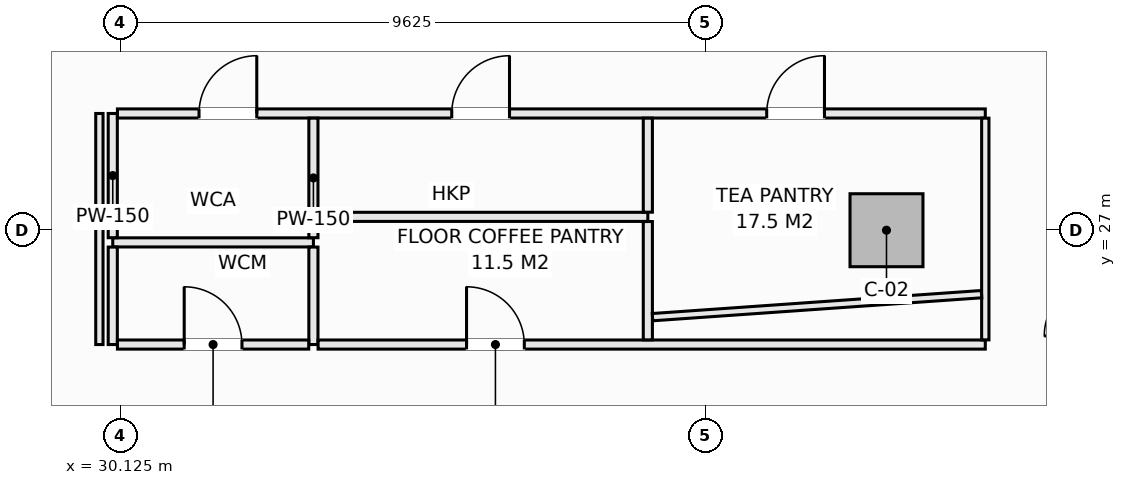
"""IFC4 building model, lengths in metres.
Left out: names, types, materials, properties, quantities, classifications, styles, units other than length and angle.
Written with IfcOpenShell. Run it as: python <this file> out.ifc"""

import sys

from ifc_helpers import new_model, si_unit, direction, frame, frame_2d, origin, origin_2d, place, context, subcontext, project, spatial, rectangle, extrude, element, fill, save


model = new_model("IFC4")
c1 = context("Model", 3, precision=1e-05, world=origin(), true_north=direction((0.0, 1.0)))
c2 = subcontext(c1, "Body", "Model", "MODEL_VIEW")
j1 = project(units=[si_unit("LENGTHUNIT", "METRE"), si_unit("PLANEANGLEUNIT", "RADIAN")], contexts=[c1])
p1 = place(None, origin())
s1 = spatial("IfcSite", under=j1, at=p1, CompositionType="ELEMENT")
p2 = place(p1, origin())
s2 = spatial("IfcBuilding", under=s1, at=p2, CompositionType="ELEMENT")
p3 = place(p2, frame((0.0, 0.0, 38.05)))
s3 = spatial("IfcBuildingStorey", under=s2, at=p3, CompositionType="ELEMENT", Elevation=38.05)
p4 = place(p3, frame((42.725, 27.0, -0.28), z_axis=(0.0, 0.0, 1.0), x_axis=(1.0, 0.0, 0.0)))
e1 = element("IfcColumn", 1, at=p4, inside=s3, PredefinedType="COLUMN", context=c2, shape_type="SweptSolid", body=[
    extrude(rectangle(XDim=1.2, YDim=1.2, at=origin_2d()), origin(), (0.0, 0.0, 1.0), 3.85),
])
p5 = place(p3, frame((30.0, 26.8, 0.0), z_axis=(0.0, 0.0, 1.0), x_axis=(1.0, 0.0, 0.0)))
e2 = element("IfcWall", 2, at=p5, inside=s3, PredefinedType="PARTITIONING", context=c2, shape_type="SweptSolid", body=[
    extrude(rectangle(XDim=3.3, YDim=0.15, at=frame_2d((1.65, 0.0))), origin(), (0.0, 0.0, 1.0), 3.57),
])
p6 = place(p3, frame((30.0, 25.12, 0.0), z_axis=(0.0, 0.0, 1.0), x_axis=(0.0, 1.0, 0.0)))
e3 = element("IfcWall", 3, at=p6, inside=s3, PredefinedType="PARTITIONING", context=c2, shape_type="SweptSolid", body=[
    extrude(rectangle(XDim=1.603, YDim=0.15, at=frame_2d((0.801, 0.0))), origin(), (0.0, 0.0, 1.0), 3.57),
])
p7 = place(p3, frame((30.0, 26.877, 0.0), z_axis=(0.0, 0.0, 1.0), x_axis=(0.0, 1.0, 0.0)))
e4 = element("IfcWall", 4, at=p7, inside=s3, PredefinedType="PARTITIONING", context=c2, shape_type="SweptSolid", body=[
    extrude(rectangle(XDim=2.043, YDim=0.15, at=frame_2d((1.021, 0.0))), origin(), (0.0, 0.0, 1.0), 3.57),
])
p8 = place(p3, frame((30.077, 28.92, 0.0), z_axis=(0.0, 0.0, 1.0), x_axis=(1.0, 0.0, 0.0)))
e5 = element("IfcWall", 5, at=p8, inside=s3, PredefinedType="PARTITIONING", context=c2, shape_type="SweptSolid", body=[
    extrude(rectangle(XDim=14.273, YDim=0.15, at=frame_2d((7.137, 0.0))), origin(), (0.0, 0.0, 1.0), 3.57),
])
p9 = place(p8, frame((1.342, 0.0, 0.0)))
e6 = element("IfcOpeningElement", 6, at=p9, cuts=e5, PredefinedType="OPENING", context=c2, shape_type="SweptSolid", body=[
    extrude(rectangle(XDim=0.95, YDim=2.1, at=frame_2d((0.475, 1.05))), frame((0.0, 0.085, 0.0), z_axis=(0.0, -1.0, 0.0), x_axis=(1.0, 0.0, 0.0)), (0.0, 0.0, 1.0), 0.17),
])
p10 = place(p8, frame((5.498, 0.0, 0.0)))
e7 = element("IfcOpeningElement", 7, at=p10, cuts=e5, PredefinedType="OPENING", context=c2, shape_type="SweptSolid", body=[
    extrude(rectangle(XDim=0.95, YDim=2.1, at=frame_2d((0.475, 1.05))), frame((0.0, 0.085, 0.0), z_axis=(0.0, -1.0, 0.0), x_axis=(1.0, 0.0, 0.0)), (0.0, 0.0, 1.0), 0.17),
])
p11 = place(p8, frame((10.678, 0.0, 0.0)))
e8 = element("IfcOpeningElement", 8, at=p11, cuts=e5, PredefinedType="OPENING", context=c2, shape_type="SweptSolid", body=[
    extrude(rectangle(XDim=0.95, YDim=2.1, at=frame_2d((0.475, 1.05))), frame((0.0, 0.085, 0.0), z_axis=(0.0, -1.0, 0.0), x_axis=(1.0, 0.0, 0.0)), (0.0, 0.0, 1.0), 0.17),
])
p12 = place(p3, frame((33.3, 25.12, 0.0), z_axis=(0.0, 0.0, 1.0), x_axis=(0.0, 1.0, 0.0)))
e9 = element("IfcWall", 9, at=p12, inside=s3, PredefinedType="PARTITIONING", context=c2, shape_type="SweptSolid", body=[
    extrude(rectangle(XDim=1.603, YDim=0.15, at=frame_2d((0.801, 0.0))), origin(), (0.0, 0.0, 1.0), 3.57),
])
p13 = place(p3, frame((33.3, 26.877, 0.0), z_axis=(0.0, 0.0, 1.0), x_axis=(0.0, 1.0, 0.0)))
e10 = element("IfcWall", 10, at=p13, inside=s3, PredefinedType="PARTITIONING", context=c2, shape_type="SweptSolid", body=[
    extrude(rectangle(XDim=1.966, YDim=0.15, at=frame_2d((0.983, 0.0))), origin(), (0.0, 0.0, 1.0), 3.57),
])
p14 = place(p3, frame((30.077, 25.12, 0.0), z_axis=(0.0, 0.0, 1.0), x_axis=(1.0, 0.0, 0.0)))
e11 = element("IfcWall", 11, at=p14, inside=s3, PredefinedType="PARTITIONING", context=c2, shape_type="SweptSolid", body=[
    extrude(rectangle(XDim=3.146, YDim=0.15, at=frame_2d((1.573, 0.0))), origin(), (0.0, 0.0, 1.0), 3.57),
])
p15 = place(p14, frame((1.098, 0.0, 0.0)))
e12 = element("IfcOpeningElement", 12, at=p15, cuts=e11, PredefinedType="OPENING", context=c2, shape_type="SweptSolid", body=[
    extrude(rectangle(XDim=0.95, YDim=2.1, at=frame_2d((0.475, 1.05))), frame((0.0, 0.085, 0.0), z_axis=(0.0, -1.0, 0.0), x_axis=(1.0, 0.0, 0.0)), (0.0, 0.0, 1.0), 0.17),
])
p16 = place(p3, frame((33.377, 25.12, 0.0), z_axis=(0.0, 0.0, 1.0), x_axis=(1.0, 0.0, 0.0)))
e13 = element("IfcWall", 13, at=p16, inside=s3, PredefinedType="PARTITIONING", context=c2, shape_type="SweptSolid", body=[
    extrude(rectangle(XDim=10.973, YDim=0.15, at=frame_2d((5.487, 0.0))), origin(), (0.0, 0.0, 1.0), 3.57),
])
p17 = place(p16, frame((2.441, 0.0, 0.0)))
e14 = element("IfcOpeningElement", 14, at=p17, cuts=e13, PredefinedType="OPENING", context=c2, shape_type="SweptSolid", body=[
    extrude(rectangle(XDim=0.95, YDim=2.1, at=frame_2d((0.475, 1.05))), frame((0.0, 0.085, 0.0), z_axis=(0.0, -1.0, 0.0), x_axis=(1.0, 0.0, 0.0)), (0.0, 0.0, 1.0), 0.17),
])
p18 = place(p3, frame((33.377, 27.22, 0.0), z_axis=(0.0, 0.0, 1.0), x_axis=(1.0, 0.0, 0.0)))
e15 = element("IfcWall", 15, at=p18, inside=s3, PredefinedType="PARTITIONING", context=c2, shape_type="SweptSolid", body=[
    extrude(rectangle(XDim=5.423, YDim=0.15, at=frame_2d((2.711, 0.0))), origin(), (0.0, 0.0, 1.0), 3.57),
])
p19 = place(p3, frame((38.8, 25.197, 0.0), z_axis=(0.0, 0.0, 1.0), x_axis=(0.0, 1.0, 0.0)))
e16 = element("IfcWall", 16, at=p19, inside=s3, PredefinedType="PARTITIONING", context=c2, shape_type="SweptSolid", body=[
    extrude(rectangle(XDim=1.946, YDim=0.15, at=frame_2d((0.973, 0.0))), origin(), (0.0, 0.0, 1.0), 3.57),
])
p20 = place(p3, frame((38.8, 27.297, 0.0), z_axis=(0.0, 0.0, 1.0), x_axis=(0.0, 1.0, 0.0)))
e17 = element("IfcWall", 17, at=p20, inside=s3, PredefinedType="PARTITIONING", context=c2, shape_type="SweptSolid", body=[
    extrude(rectangle(XDim=1.546, YDim=0.15, at=frame_2d((0.773, 0.0))), origin(), (0.0, 0.0, 1.0), 3.57),
])
p21 = place(p3, frame((29.78, 25.12, 0.0), z_axis=(0.0, 0.0, 1.0), x_axis=(0.0, 1.0, 0.0)))
e18 = element("IfcWall", 18, at=p21, inside=s3, PredefinedType="PARTITIONING", context=c2, shape_type="SweptSolid", body=[
    extrude(rectangle(XDim=3.8, YDim=0.12, at=frame_2d((1.9, 0.0))), origin(), (0.0, 0.0, 1.0), 3.57),
])
p22 = place(p3, frame((44.35, 25.197, 0.0), z_axis=(0.0, 0.0, 1.0), x_axis=(0.0, 1.0, 0.0)))
e19 = element("IfcWall", 19, at=p22, inside=s3, PredefinedType="PARTITIONING", context=c2, shape_type="SweptSolid", body=[
    extrude(rectangle(XDim=3.646, YDim=0.12, at=frame_2d((1.823, 0.0))), origin(), (0.0, 0.0, 1.0), 3.57),
])
p23 = place(p3, frame((38.877, 25.57, 0.0), z_axis=(0.0, 0.0, 1.0), x_axis=(0.997563605061, 0.069762840094, 0.0)))
e20 = element("IfcWall", 20, at=p23, inside=s3, PredefinedType="PARTITIONING", context=c2, shape_type="SweptSolid", body=[
    extrude(rectangle(XDim=5.424, YDim=0.12, at=frame_2d((2.712, 0.0))), origin(), (0.0, 0.0, 1.0), 3.57),
])
p24 = place(p9, origin())
e21 = element("IfcDoor", 21, at=p24, inside=s3, OperationType="SINGLE_SWING_RIGHT", PredefinedType="DOOR", context=c2, shape_type="SweptSolid", body=[
    extrude(rectangle(XDim=0.95, YDim=2.1, at=frame_2d((0.475, 1.05))), frame((0.0, 0.025, 0.0), z_axis=(0.0, -1.0, 0.0), x_axis=(1.0, 0.0, 0.0)), (0.0, 0.0, 1.0), 0.05),
])
fill(e6, e21)
p25 = place(p15, origin())
e22 = element("IfcDoor", 22, at=p25, inside=s3, OperationType="SINGLE_SWING_LEFT", PredefinedType="DOOR", context=c2, shape_type="SweptSolid", body=[
    extrude(rectangle(XDim=0.95, YDim=2.1, at=frame_2d((0.475, 1.05))), frame((0.0, 0.025, 0.0), z_axis=(0.0, -1.0, 0.0), x_axis=(1.0, 0.0, 0.0)), (0.0, 0.0, 1.0), 0.05),
])
fill(e12, e22)
p26 = place(p10, origin())
e23 = element("IfcDoor", 23, at=p26, inside=s3, OperationType="SINGLE_SWING_RIGHT", PredefinedType="DOOR", context=c2, shape_type="SweptSolid", body=[
    extrude(rectangle(XDim=0.95, YDim=2.1, at=frame_2d((0.475, 1.05))), frame((0.0, 0.025, 0.0), z_axis=(0.0, -1.0, 0.0), x_axis=(1.0, 0.0, 0.0)), (0.0, 0.0, 1.0), 0.05),
])
fill(e7, e23)
p27 = place(p17, origin())
e24 = element("IfcDoor", 24, at=p27, inside=s3, OperationType="SINGLE_SWING_LEFT", PredefinedType="DOOR", context=c2, shape_type="SweptSolid", body=[
    extrude(rectangle(XDim=0.95, YDim=2.1, at=frame_2d((0.475, 1.05))), frame((0.0, 0.025, 0.0), z_axis=(0.0, -1.0, 0.0), x_axis=(1.0, 0.0, 0.0)), (0.0, 0.0, 1.0), 0.05),
])
fill(e14, e24)
p28 = place(p11, origin())
e25 = element("IfcDoor", 25, at=p28, inside=s3, OperationType="SINGLE_SWING_RIGHT", PredefinedType="DOOR", context=c2, shape_type="SweptSolid", body=[
    extrude(rectangle(XDim=0.95, YDim=2.1, at=frame_2d((0.475, 1.05))), frame((0.0, 0.025, 0.0), z_axis=(0.0, -1.0, 0.0), x_axis=(1.0, 0.0, 0.0)), (0.0, 0.0, 1.0), 0.05),
])
fill(e8, e25)
save(model, sys.argv[1])
